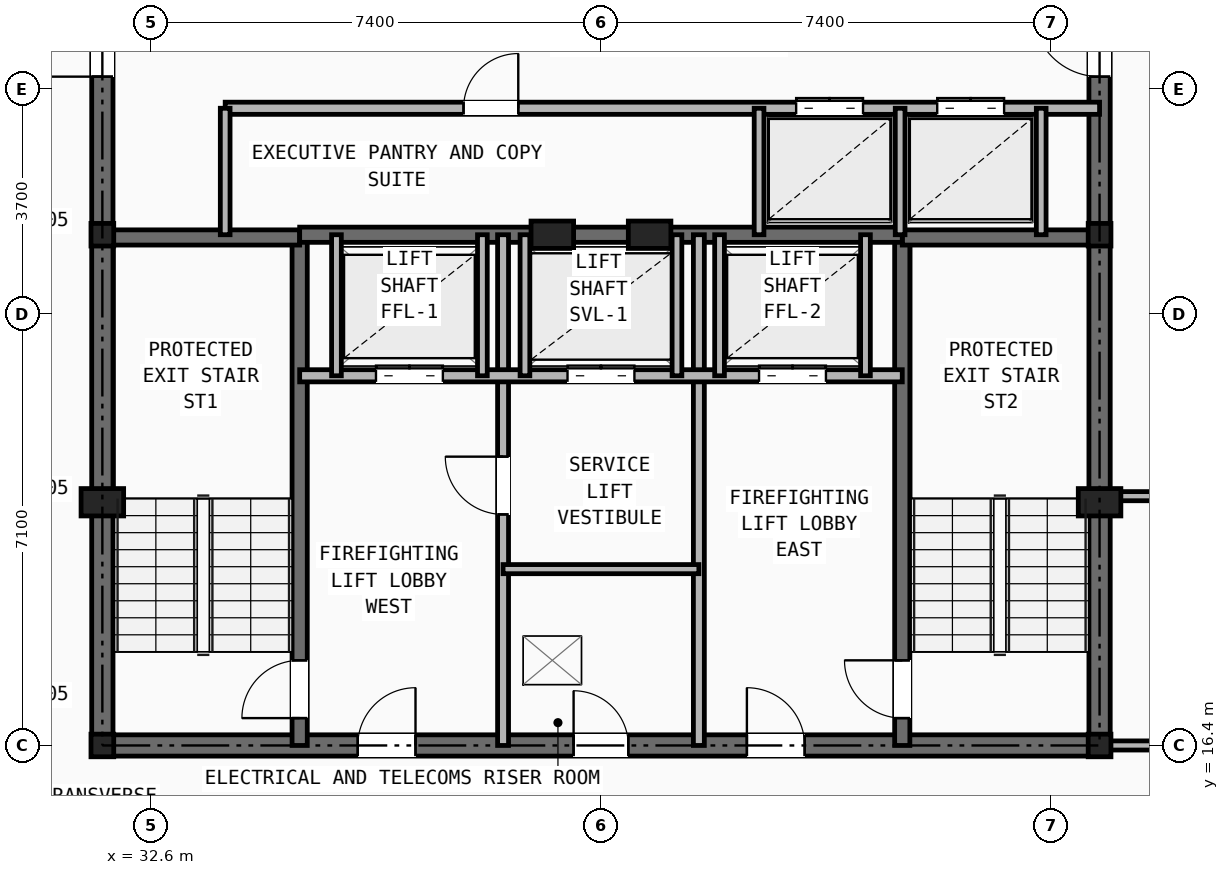
"""IFC4 building model, lengths in metres.
Left out: names, types, materials, properties, quantities, classifications, styles, units other than length and angle.
Written with IfcOpenShell. Run it as: python <this file> out.ifc"""

import sys

from ifc_helpers import new_model, si_unit, direction, frame, frame_2d, origin, origin_2d, place, context, subcontext, project, spatial, rectangle, i_section, extrude, element, fill, save


model = new_model("IFC4")
c1 = context("Model", 3, precision=1e-05, world=origin(), true_north=direction((0.0, 1.0)))
c2 = subcontext(c1, "Body", "Model", "MODEL_VIEW")
j1 = project(units=[si_unit("LENGTHUNIT", "METRE"), si_unit("PLANEANGLEUNIT", "RADIAN")], contexts=[c1])
p1 = place(None, origin())
s1 = spatial("IfcSite", under=j1, at=p1, CompositionType="ELEMENT")
p2 = place(p1, origin())
s2 = spatial("IfcBuilding", under=s1, at=p2, CompositionType="ELEMENT")
p3 = place(p2, frame((0.0, 0.0, 239.9)))
s3 = spatial("IfcBuildingStorey", under=s2, at=p3, CompositionType="ELEMENT", Elevation=239.9)
for number, where, z_axis, x_axis in (
    (1, (31.8, 16.4, 0.0), (0.0, 0.0, 1.0), (1.0, 0.0, 0.0)),
    (2, (48.2, 16.4, 0.0), (0.0, 0.0, 1.0), (1.0, 0.0, 0.0)),
    (3, (31.8, 24.8, 0.0), (0.0, 0.0, 1.0), (1.0, 0.0, 0.0)),
    (4, (48.2, 24.8, 0.0), (0.0, 0.0, 1.0), (1.0, 0.0, 0.0)),
):
    element("IfcColumn", number, at=place(p3, frame(where, z_axis=z_axis, x_axis=x_axis)), inside=s3, PredefinedType="COLUMN", context=c2, shape_type="SweptSolid", body=[
        extrude(i_section(OverallWidth=0.374, OverallDepth=0.372, WebThickness=0.016, FlangeThickness=0.026, at=origin_2d()), origin(), (0.0, 0.0, 1.0), 3.5),
    ])
for number, where, z_axis, x_axis in (
    (5, (31.8, 20.4, 0.0), (0.0, 0.0, 1.0), (1.0, 0.0, 0.0)),
    (6, (48.2, 20.4, 0.0), (0.0, 0.0, 1.0), (1.0, 0.0, 0.0)),
    (7, (39.2, 24.8, 0.0), (0.0, 0.0, 1.0), (1.0, 0.0, 0.0)),
    (8, (40.8, 24.8, 0.0), (0.0, 0.0, 1.0), (1.0, 0.0, 0.0)),
):
    element("IfcColumn", number, at=place(p3, frame(where, z_axis=z_axis, x_axis=x_axis)), inside=s3, PredefinedType="PILASTER", context=c2, shape_type="SweptSolid", body=[
        extrude(rectangle(XDim=0.7, YDim=0.45, at=origin_2d()), origin(), (0.0, 0.0, 1.0), 3.5),
    ])
p4 = place(p3, frame((31.8, 16.4, 0.0), z_axis=(0.0, 0.0, 1.0), x_axis=(1.0, 0.0, 0.0)))
e9 = element("IfcWall", 9, at=p4, inside=s3, PredefinedType="SHEAR", context=c2, shape_type="SweptSolid", body=[
    extrude(rectangle(XDim=16.4, YDim=0.35, at=frame_2d((8.2, 0.0))), origin(), (0.0, 0.0, 1.0), 3.25),
])
p5 = place(p4, frame((7.75, 0.0, 0.0)))
e10 = element("IfcOpeningElement", 10, at=p5, cuts=e9, PredefinedType="OPENING", context=c2, shape_type="SweptSolid", body=[
    extrude(rectangle(XDim=0.9, YDim=2.1, at=frame_2d((0.45, 1.05))), frame((0.0, 0.185, 0.0), z_axis=(0.0, -1.0, 0.0), x_axis=(1.0, 0.0, 0.0)), (0.0, 0.0, 1.0), 0.37),
])
p6 = place(p4, frame((4.2, 0.0, 0.0)))
e11 = element("IfcOpeningElement", 11, at=p6, cuts=e9, PredefinedType="OPENING", context=c2, shape_type="SweptSolid", body=[
    extrude(rectangle(XDim=0.95, YDim=2.1, at=frame_2d((0.475, 1.05))), frame((0.0, 0.185, 0.0), z_axis=(0.0, -1.0, 0.0), x_axis=(1.0, 0.0, 0.0)), (0.0, 0.0, 1.0), 0.37),
])
p7 = place(p4, frame((10.6, 0.0, 0.0)))
e12 = element("IfcOpeningElement", 12, at=p7, cuts=e9, PredefinedType="OPENING", context=c2, shape_type="SweptSolid", body=[
    extrude(rectangle(XDim=0.95, YDim=2.1, at=frame_2d((0.475, 1.05))), frame((0.0, 0.185, 0.0), z_axis=(0.0, -1.0, 0.0), x_axis=(1.0, 0.0, 0.0)), (0.0, 0.0, 1.0), 0.37),
])
p8 = place(p3, frame((31.8, 16.4, 0.0), z_axis=(0.0, 0.0, 1.0), x_axis=(0.0, 1.0, 0.0)))
e13 = element("IfcWall", 13, at=p8, inside=s3, PredefinedType="SHEAR", context=c2, shape_type="SweptSolid", body=[
    extrude(rectangle(XDim=14.8, YDim=0.35, at=frame_2d((7.4, 0.0))), origin(), (0.0, 0.0, 1.0), 3.25),
])
p9 = place(p8, frame((11.0, 0.0, 0.0)))
e14 = element("IfcOpeningElement", 14, at=p9, cuts=e13, PredefinedType="OPENING", context=c2, shape_type="SweptSolid", body=[
    extrude(rectangle(XDim=1.1, YDim=2.15, at=frame_2d((0.55, 1.075))), frame((0.0, 0.185, 0.0), z_axis=(0.0, -1.0, 0.0), x_axis=(1.0, 0.0, 0.0)), (0.0, 0.0, 1.0), 0.37),
])
p10 = place(p3, frame((48.2, 16.4, 0.0), z_axis=(0.0, 0.0, 1.0), x_axis=(0.0, 1.0, 0.0)))
e15 = element("IfcWall", 15, at=p10, inside=s3, PredefinedType="SHEAR", context=c2, shape_type="SweptSolid", body=[
    extrude(rectangle(XDim=14.8, YDim=0.35, at=frame_2d((7.4, 0.0))), origin(), (0.0, 0.0, 1.0), 3.25),
])
p11 = place(p10, frame((11.0, 0.0, 0.0)))
e16 = element("IfcOpeningElement", 16, at=p11, cuts=e15, PredefinedType="OPENING", context=c2, shape_type="SweptSolid", body=[
    extrude(rectangle(XDim=1.1, YDim=2.15, at=frame_2d((0.55, 1.075))), frame((0.0, 0.185, 0.0), z_axis=(0.0, -1.0, 0.0), x_axis=(1.0, 0.0, 0.0)), (0.0, 0.0, 1.0), 0.37),
])
p12 = place(p3, frame((35.045, 16.4, 0.0), z_axis=(0.0, 0.0, 1.0), x_axis=(0.0, 1.0, 0.0)))
e17 = element("IfcWall", 17, at=p12, inside=s3, PredefinedType="SHEAR", context=c2, shape_type="SweptSolid", body=[
    extrude(rectangle(XDim=8.4, YDim=0.25, at=frame_2d((4.2, 0.0))), origin(), (0.0, 0.0, 1.0), 3.25),
])
p13 = place(p12, frame((0.45, 0.0, 0.0)))
e18 = element("IfcOpeningElement", 18, at=p13, cuts=e17, PredefinedType="OPENING", context=c2, shape_type="SweptSolid", body=[
    extrude(rectangle(XDim=0.95, YDim=2.1, at=frame_2d((0.475, 1.05))), frame((0.0, 0.135, 0.0), z_axis=(0.0, -1.0, 0.0), x_axis=(1.0, 0.0, 0.0)), (0.0, 0.0, 1.0), 0.27),
])
p14 = place(p3, frame((31.8, 24.755, 0.0), z_axis=(0.0, 0.0, 1.0), x_axis=(1.0, 0.0, 0.0)))
e19 = element("IfcWall", 19, at=p14, inside=s3, PredefinedType="SHEAR", context=c2, shape_type="SweptSolid", body=[
    extrude(rectangle(XDim=3.245, YDim=0.25, at=frame_2d((1.623, 0.0))), origin(), (0.0, 0.0, 1.0), 3.25),
])
p15 = place(p3, frame((44.955, 16.4, 0.0), z_axis=(0.0, 0.0, 1.0), x_axis=(0.0, 1.0, 0.0)))
e20 = element("IfcWall", 20, at=p15, inside=s3, PredefinedType="SHEAR", context=c2, shape_type="SweptSolid", body=[
    extrude(rectangle(XDim=8.4, YDim=0.25, at=frame_2d((4.2, 0.0))), origin(), (0.0, 0.0, 1.0), 3.25),
])
p16 = place(p15, frame((0.45, 0.0, 0.0)))
e21 = element("IfcOpeningElement", 21, at=p16, cuts=e20, PredefinedType="OPENING", context=c2, shape_type="SweptSolid", body=[
    extrude(rectangle(XDim=0.95, YDim=2.1, at=frame_2d((0.475, 1.05))), frame((0.0, 0.135, 0.0), z_axis=(0.0, -1.0, 0.0), x_axis=(1.0, 0.0, 0.0)), (0.0, 0.0, 1.0), 0.27),
])
p17 = place(p3, frame((44.955, 24.755, 0.0), z_axis=(0.0, 0.0, 1.0), x_axis=(1.0, 0.0, 0.0)))
e22 = element("IfcWall", 22, at=p17, inside=s3, PredefinedType="SHEAR", context=c2, shape_type="SweptSolid", body=[
    extrude(rectangle(XDim=3.245, YDim=0.25, at=frame_2d((1.623, 0.0))), origin(), (0.0, 0.0, 1.0), 3.25),
])
p18 = place(p3, frame((35.045, 24.8, 0.0), z_axis=(0.0, 0.0, 1.0), x_axis=(1.0, 0.0, 0.0)))
e23 = element("IfcWall", 23, at=p18, inside=s3, PredefinedType="SHEAR", context=c2, shape_type="SweptSolid", body=[
    extrude(rectangle(XDim=9.91, YDim=0.25, at=frame_2d((4.955, 0.0))), origin(), (0.0, 0.0, 1.0), 3.25),
])
p19 = place(p3, frame((38.39, 16.4, 0.0), z_axis=(0.0, 0.0, 1.0), x_axis=(0.0, 1.0, 0.0)))
e24 = element("IfcWall", 24, at=p19, inside=s3, PredefinedType="PARTITIONING", context=c2, shape_type="SweptSolid", body=[
    extrude(rectangle(XDim=8.4, YDim=0.18, at=frame_2d((4.2, 0.0))), origin(), (0.0, 0.0, 1.0), 2.705),
])
p20 = place(p19, frame((3.8, 0.0, 0.0)))
e25 = element("IfcOpeningElement", 25, at=p20, cuts=e24, PredefinedType="OPENING", context=c2, shape_type="SweptSolid", body=[
    extrude(rectangle(XDim=0.95, YDim=2.1, at=frame_2d((0.475, 1.05))), frame((0.0, 0.1, 0.0), z_axis=(0.0, -1.0, 0.0), x_axis=(1.0, 0.0, 0.0)), (0.0, 0.0, 1.0), 0.2),
])
p21 = place(p3, frame((41.61, 16.4, 0.0), z_axis=(0.0, 0.0, 1.0), x_axis=(0.0, 1.0, 0.0)))
e26 = element("IfcWall", 26, at=p21, inside=s3, PredefinedType="PARTITIONING", context=c2, shape_type="SweptSolid", body=[
    extrude(rectangle(XDim=8.4, YDim=0.18, at=frame_2d((4.2, 0.0))), origin(), (0.0, 0.0, 1.0), 2.705),
])
p22 = place(p3, frame((35.045, 22.48, 0.0), z_axis=(0.0, 0.0, 1.0), x_axis=(1.0, 0.0, 0.0)))
e27 = element("IfcWall", 27, at=p22, inside=s3, PredefinedType="SOLIDWALL", context=c2, shape_type="SweptSolid", body=[
    extrude(rectangle(XDim=9.91, YDim=0.2, at=frame_2d((4.955, 0.0))), origin(), (0.0, 0.0, 1.0), 3.25),
])
p23 = place(p22, frame((1.255, 0.0, 0.0)))
e28 = element("IfcOpeningElement", 28, at=p23, cuts=e27, PredefinedType="OPENING", context=c2, shape_type="SweptSolid", body=[
    extrude(rectangle(XDim=1.1, YDim=2.15, at=frame_2d((0.55, 1.075))), frame((0.0, 0.11, 0.0), z_axis=(0.0, -1.0, 0.0), x_axis=(1.0, 0.0, 0.0)), (0.0, 0.0, 1.0), 0.22),
])
p24 = place(p22, frame((7.555, 0.0, 0.0)))
e29 = element("IfcOpeningElement", 29, at=p24, cuts=e27, PredefinedType="OPENING", context=c2, shape_type="SweptSolid", body=[
    extrude(rectangle(XDim=1.1, YDim=2.15, at=frame_2d((0.55, 1.075))), frame((0.0, 0.11, 0.0), z_axis=(0.0, -1.0, 0.0), x_axis=(1.0, 0.0, 0.0)), (0.0, 0.0, 1.0), 0.22),
])
p25 = place(p22, frame((4.405, 0.0, 0.0)))
e30 = element("IfcOpeningElement", 30, at=p25, cuts=e27, PredefinedType="OPENING", context=c2, shape_type="SweptSolid", body=[
    extrude(rectangle(XDim=1.1, YDim=2.15, at=frame_2d((0.55, 1.075))), frame((0.0, 0.11, 0.0), z_axis=(0.0, -1.0, 0.0), x_axis=(1.0, 0.0, 0.0)), (0.0, 0.0, 1.0), 0.22),
])
p26 = place(p3, frame((38.39, 19.3, 0.0), z_axis=(0.0, 0.0, 1.0), x_axis=(1.0, 0.0, 0.0)))
e31 = element("IfcWall", 31, at=p26, inside=s3, PredefinedType="PARTITIONING", context=c2, shape_type="SweptSolid", body=[
    extrude(rectangle(XDim=3.22, YDim=0.15, at=frame_2d((1.61, 0.0))), origin(), (0.0, 0.0, 1.0), 3.25),
])
for number, where, z_axis, x_axis in (
    (32, (35.65, 22.48, 0.0), (0.0, 0.0, 1.0), (0.0, 1.0, 0.0)),
    (33, (38.05, 22.48, 0.0), (0.0, 0.0, 1.0), (0.0, 1.0, 0.0)),
    (34, (41.95, 22.48, 0.0), (0.0, 0.0, 1.0), (0.0, 1.0, 0.0)),
    (35, (44.35, 22.48, 0.0), (0.0, 0.0, 1.0), (0.0, 1.0, 0.0)),
    (36, (38.75, 22.48, 0.0), (0.0, 0.0, 1.0), (0.0, 1.0, 0.0)),
    (37, (41.25, 22.48, 0.0), (0.0, 0.0, 1.0), (0.0, 1.0, 0.0)),
):
    element("IfcWall", number, at=place(p3, frame(where, z_axis=z_axis, x_axis=x_axis)), inside=s3, PredefinedType="SOLIDWALL", context=c2, shape_type="SweptSolid", body=[
        extrude(rectangle(XDim=2.32, YDim=0.16, at=frame_2d((1.16, 0.0))), origin(), (0.0, 0.0, 1.0), 3.25),
    ])
p27 = place(p3, frame((33.82, 26.88, 0.0), z_axis=(0.0, 0.0, 1.0), x_axis=(1.0, 0.0, 0.0)))
e38 = element("IfcWall", 38, at=p27, inside=s3, PredefinedType="SOLIDWALL", context=c2, shape_type="SweptSolid", body=[
    extrude(rectangle(XDim=14.38, YDim=0.2, at=frame_2d((7.19, 0.0))), origin(), (0.0, 0.0, 1.0), 2.705),
])
p28 = place(p27, frame((3.92, 0.0, 0.0)))
e39 = element("IfcOpeningElement", 39, at=p28, cuts=e38, PredefinedType="OPENING", context=c2, shape_type="SweptSolid", body=[
    extrude(rectangle(XDim=0.9, YDim=2.1, at=frame_2d((0.45, 1.05))), frame((0.0, 0.11, 0.0), z_axis=(0.0, -1.0, 0.0), x_axis=(1.0, 0.0, 0.0)), (0.0, 0.0, 1.0), 0.22),
])
p29 = place(p27, frame((9.39, 0.0, 0.0)))
e40 = element("IfcOpeningElement", 40, at=p29, cuts=e38, PredefinedType="OPENING", context=c2, shape_type="SweptSolid", body=[
    extrude(rectangle(XDim=1.1, YDim=2.15, at=frame_2d((0.55, 1.075))), frame((0.0, 0.11, 0.0), z_axis=(0.0, -1.0, 0.0), x_axis=(1.0, 0.0, 0.0)), (0.0, 0.0, 1.0), 0.22),
])
p30 = place(p27, frame((11.71, 0.0, 0.0)))
e41 = element("IfcOpeningElement", 41, at=p30, cuts=e38, PredefinedType="OPENING", context=c2, shape_type="SweptSolid", body=[
    extrude(rectangle(XDim=1.1, YDim=2.15, at=frame_2d((0.55, 1.075))), frame((0.0, 0.11, 0.0), z_axis=(0.0, -1.0, 0.0), x_axis=(1.0, 0.0, 0.0)), (0.0, 0.0, 1.0), 0.22),
])
for number, where, z_axis, x_axis in (
    (42, (33.82, 24.8, 0.0), (0.0, 0.0, 1.0), (0.0, 1.0, 0.0)),
    (43, (42.6, 24.8, 0.0), (0.0, 0.0, 1.0), (0.0, 1.0, 0.0)),
    (44, (44.92, 24.8, 0.0), (0.0, 0.0, 1.0), (0.0, 1.0, 0.0)),
    (45, (47.24, 24.8, 0.0), (0.0, 0.0, 1.0), (0.0, 1.0, 0.0)),
):
    element("IfcWall", number, at=place(p3, frame(where, z_axis=z_axis, x_axis=x_axis)), inside=s3, PredefinedType="SOLIDWALL", context=c2, shape_type="SweptSolid", body=[
        extrude(rectangle(XDim=2.08, YDim=0.16, at=frame_2d((1.04, 0.0))), origin(), (0.0, 0.0, 1.0), 3.25),
    ])
p31 = place(p3, frame((48.2, 16.4, 0.0), z_axis=(0.0, 0.0, 1.0), x_axis=(1.0, 0.0, 0.0)))
e46 = element("IfcWall", 46, at=p31, inside=s3, PredefinedType="PARTITIONING", context=c2, shape_type="SweptSolid", body=[
    extrude(rectangle(XDim=15.591, YDim=0.15, at=frame_2d((7.795, 0.0))), origin(), (0.0, 0.0, 1.0), 2.265),
])
p32 = place(p3, frame((48.2, 20.5, 0.0), z_axis=(0.0, 0.0, 1.0), x_axis=(1.0, 0.0, 0.0)))
e47 = element("IfcWall", 47, at=p32, inside=s3, PredefinedType="PARTITIONING", context=c2, shape_type="SweptSolid", body=[
    extrude(rectangle(XDim=12.706, YDim=0.15, at=frame_2d((6.353, 0.0))), origin(), (0.0, 0.0, 1.0), 2.265),
])
p33 = place(p32, frame((1.4, 0.0, 0.0)))
e48 = element("IfcOpeningElement", 48, at=p33, cuts=e47, PredefinedType="OPENING", context=c2, shape_type="SweptSolid", body=[
    extrude(rectangle(XDim=0.95, YDim=2.1, at=frame_2d((0.475, 1.05))), frame((0.0, 0.085, 0.0), z_axis=(0.0, -1.0, 0.0), x_axis=(1.0, 0.0, 0.0)), (0.0, 0.0, 1.0), 0.17),
])
p34 = place(p5, origin())
e49 = element("IfcDoor", 49, at=p34, inside=s3, OperationType="SINGLE_SWING_LEFT", PredefinedType="DOOR", context=c2, shape_type="SweptSolid", body=[
    extrude(rectangle(XDim=0.9, YDim=2.1, at=frame_2d((0.45, 1.05))), frame((0.0, 0.025, 0.0), z_axis=(0.0, -1.0, 0.0), x_axis=(1.0, 0.0, 0.0)), (0.0, 0.0, 1.0), 0.05),
])
fill(e10, e49)
p35 = place(p20, origin())
e50 = element("IfcDoor", 50, at=p35, inside=s3, OperationType="SINGLE_SWING_RIGHT", PredefinedType="DOOR", context=c2, shape_type="SweptSolid", body=[
    extrude(rectangle(XDim=0.95, YDim=2.1, at=frame_2d((0.475, 1.05))), frame((0.0, 0.025, 0.0), z_axis=(0.0, -1.0, 0.0), x_axis=(1.0, 0.0, 0.0)), (0.0, 0.0, 1.0), 0.05),
])
fill(e25, e50)
p36 = place(p13, origin())
e51 = element("IfcDoor", 51, at=p36, inside=s3, OperationType="SINGLE_SWING_LEFT", PredefinedType="DOOR", context=c2, shape_type="SweptSolid", body=[
    extrude(rectangle(XDim=0.95, YDim=2.1, at=frame_2d((0.475, 1.05))), frame((0.0, 0.025, 0.0), z_axis=(0.0, -1.0, 0.0), x_axis=(1.0, 0.0, 0.0)), (0.0, 0.0, 1.0), 0.05),
])
fill(e18, e51)
p37 = place(p16, origin())
e52 = element("IfcDoor", 52, at=p37, inside=s3, OperationType="SINGLE_SWING_RIGHT", PredefinedType="DOOR", context=c2, shape_type="SweptSolid", body=[
    extrude(rectangle(XDim=0.95, YDim=2.1, at=frame_2d((0.475, 1.05))), frame((0.0, 0.025, 0.0), z_axis=(0.0, -1.0, 0.0), x_axis=(1.0, 0.0, 0.0)), (0.0, 0.0, 1.0), 0.05),
])
fill(e21, e52)
p38 = place(p6, origin())
e53 = element("IfcDoor", 53, at=p38, inside=s3, OperationType="SINGLE_SWING_RIGHT", PredefinedType="DOOR", context=c2, shape_type="SweptSolid", body=[
    extrude(rectangle(XDim=0.95, YDim=2.1, at=frame_2d((0.475, 1.05))), frame((0.0, 0.025, 0.0), z_axis=(0.0, -1.0, 0.0), x_axis=(1.0, 0.0, 0.0)), (0.0, 0.0, 1.0), 0.05),
])
fill(e11, e53)
p39 = place(p7, origin())
e54 = element("IfcDoor", 54, at=p39, inside=s3, OperationType="SINGLE_SWING_LEFT", PredefinedType="DOOR", context=c2, shape_type="SweptSolid", body=[
    extrude(rectangle(XDim=0.95, YDim=2.1, at=frame_2d((0.475, 1.05))), frame((0.0, 0.025, 0.0), z_axis=(0.0, -1.0, 0.0), x_axis=(1.0, 0.0, 0.0)), (0.0, 0.0, 1.0), 0.05),
])
fill(e12, e54)
p40 = place(p23, origin())
e55 = element("IfcDoor", 55, at=p40, inside=s3, OperationType="DOUBLE_DOOR_SLIDING", PredefinedType="DOOR", context=c2, shape_type="SweptSolid", body=[
    extrude(rectangle(XDim=1.1, YDim=2.15, at=frame_2d((0.55, 1.075))), frame((0.0, 0.025, 0.0), z_axis=(0.0, -1.0, 0.0), x_axis=(1.0, 0.0, 0.0)), (0.0, 0.0, 1.0), 0.05),
])
fill(e28, e55)
p41 = place(p24, origin())
e56 = element("IfcDoor", 56, at=p41, inside=s3, OperationType="DOUBLE_DOOR_SLIDING", PredefinedType="DOOR", context=c2, shape_type="SweptSolid", body=[
    extrude(rectangle(XDim=1.1, YDim=2.15, at=frame_2d((0.55, 1.075))), frame((0.0, 0.025, 0.0), z_axis=(0.0, -1.0, 0.0), x_axis=(1.0, 0.0, 0.0)), (0.0, 0.0, 1.0), 0.05),
])
fill(e29, e56)
p42 = place(p25, origin())
e57 = element("IfcDoor", 57, at=p42, inside=s3, OperationType="DOUBLE_DOOR_SLIDING", PredefinedType="DOOR", context=c2, shape_type="SweptSolid", body=[
    extrude(rectangle(XDim=1.1, YDim=2.15, at=frame_2d((0.55, 1.075))), frame((0.0, 0.025, 0.0), z_axis=(0.0, -1.0, 0.0), x_axis=(1.0, 0.0, 0.0)), (0.0, 0.0, 1.0), 0.05),
])
fill(e30, e57)
p43 = place(p9, origin())
e58 = element("IfcDoor", 58, at=p43, inside=s3, OperationType="SINGLE_SWING_LEFT", PredefinedType="DOOR", context=c2, shape_type="SweptSolid", body=[
    extrude(rectangle(XDim=1.1, YDim=2.15, at=frame_2d((0.55, 1.075))), frame((0.0, 0.025, 0.0), z_axis=(0.0, -1.0, 0.0), x_axis=(1.0, 0.0, 0.0)), (0.0, 0.0, 1.0), 0.05),
])
fill(e14, e58)
p44 = place(p11, origin())
e59 = element("IfcDoor", 59, at=p44, inside=s3, OperationType="SINGLE_SWING_RIGHT", PredefinedType="DOOR", context=c2, shape_type="SweptSolid", body=[
    extrude(rectangle(XDim=1.1, YDim=2.15, at=frame_2d((0.55, 1.075))), frame((0.0, 0.025, 0.0), z_axis=(0.0, -1.0, 0.0), x_axis=(1.0, 0.0, 0.0)), (0.0, 0.0, 1.0), 0.05),
])
fill(e16, e59)
p45 = place(p28, origin())
e60 = element("IfcDoor", 60, at=p45, inside=s3, OperationType="SINGLE_SWING_RIGHT", PredefinedType="DOOR", context=c2, shape_type="SweptSolid", body=[
    extrude(rectangle(XDim=0.9, YDim=2.1, at=frame_2d((0.45, 1.05))), frame((0.0, 0.025, 0.0), z_axis=(0.0, -1.0, 0.0), x_axis=(1.0, 0.0, 0.0)), (0.0, 0.0, 1.0), 0.05),
])
fill(e39, e60)
p46 = place(p29, origin())
e61 = element("IfcDoor", 61, at=p46, inside=s3, OperationType="DOUBLE_DOOR_SLIDING", PredefinedType="DOOR", context=c2, shape_type="SweptSolid", body=[
    extrude(rectangle(XDim=1.1, YDim=2.15, at=frame_2d((0.55, 1.075))), frame((0.0, 0.025, 0.0), z_axis=(0.0, -1.0, 0.0), x_axis=(1.0, 0.0, 0.0)), (0.0, 0.0, 1.0), 0.05),
])
fill(e40, e61)
p47 = place(p30, origin())
e62 = element("IfcDoor", 62, at=p47, inside=s3, OperationType="DOUBLE_DOOR_SLIDING", PredefinedType="DOOR", context=c2, shape_type="SweptSolid", body=[
    extrude(rectangle(XDim=1.1, YDim=2.15, at=frame_2d((0.55, 1.075))), frame((0.0, 0.025, 0.0), z_axis=(0.0, -1.0, 0.0), x_axis=(1.0, 0.0, 0.0)), (0.0, 0.0, 1.0), 0.05),
])
fill(e41, e62)
save(model, sys.argv[1])
